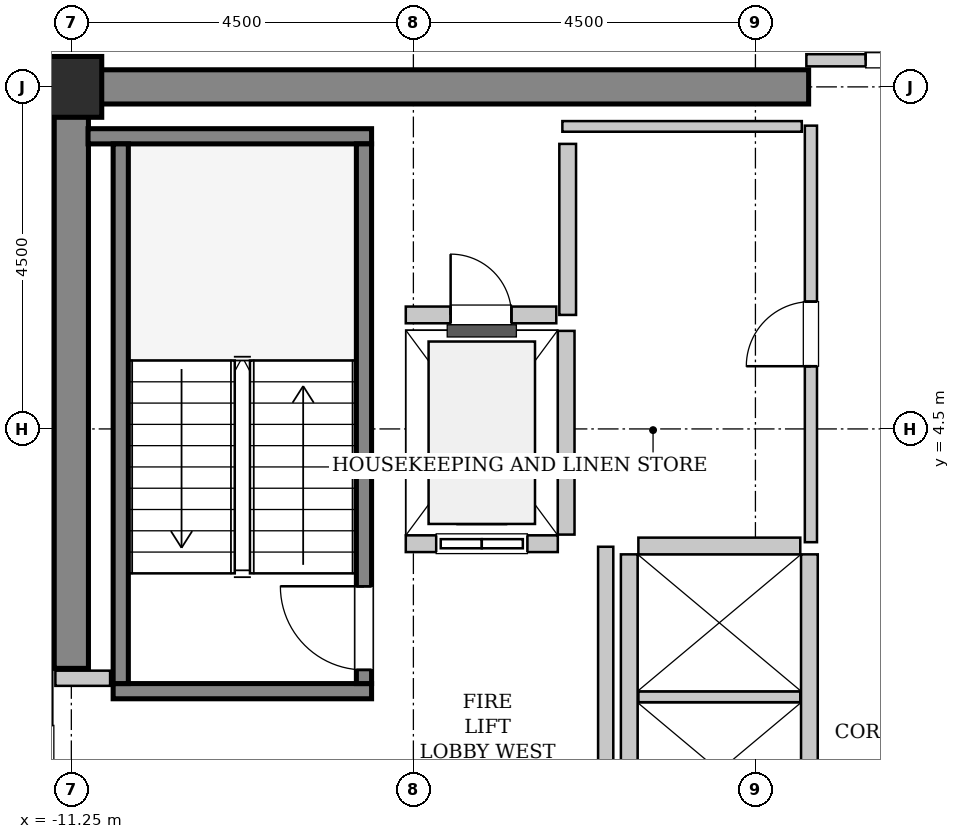
"""IFC4 building model, lengths in metres.
Left out: names, types, materials, properties, quantities, classifications, styles, units other than length and angle.
Written with IfcOpenShell. Run it as: python <this file> out.ifc"""

import sys

from ifc_helpers import new_model, si_unit, direction, frame, frame_2d, origin, origin_2d, place, context, subcontext, project, spatial, rectangle, hollow_rectangle, extrude, source, transform, mapped, element, fill, save


model = new_model("IFC4")
c1 = context("Model", 3, precision=1e-05, world=origin(), true_north=direction((0.0, 1.0)))
c2 = subcontext(c1, "Body", "Model", "MODEL_VIEW")
j1 = project(units=[si_unit("LENGTHUNIT", "METRE"), si_unit("PLANEANGLEUNIT", "RADIAN")], contexts=[c1])
p1 = place(None, origin())
s1 = spatial("IfcSite", under=j1, at=p1, CompositionType="ELEMENT")
p2 = place(p1, origin())
s2 = spatial("IfcBuilding", under=s1, at=p2, CompositionType="ELEMENT")
p3 = place(p2, frame((0.0, 0.0, 210.4)))
s3 = spatial("IfcBuildingStorey", under=s2, at=p3, CompositionType="ELEMENT", Elevation=210.4)
m1 = source(origin(), c2, "Body", "SweptSolid", [
    extrude(rectangle(XDim=9.925, YDim=0.45, at=frame_2d((4.962, 0.0))), origin(), (0.0, 0.0, 1.0), 3.8),
])
p4 = place(p3, frame((-11.475, 9.0, 0.0), z_axis=(0.0, 0.0, 1.0), x_axis=(1.0, 0.0, 0.0)))
e1 = element("IfcWall", 1, at=p4, inside=s3, PredefinedType="SHEAR", context=c2, shape_type="MappedRepresentation", body=[
    mapped(m1, transform((0.0, 0.0, 0.0), x_axis=(1.0, 0.0, 0.0), y_axis=(0.0, 1.0, 0.0), z_axis=(0.0, 0.0, 1.0), scale=1.0)),
])
m2 = source(origin(), c2, "Body", "SweptSolid", [
    extrude(rectangle(XDim=7.425, YDim=0.45, at=frame_2d((3.712, 0.0))), origin(), (0.0, 0.0, 1.0), 3.8),
])
p5 = place(p3, frame((-11.25, 1.35, 0.0), z_axis=(0.0, 0.0, 1.0), x_axis=(0.0, 1.0, 0.0)))
e2 = element("IfcWall", 2, at=p5, inside=s3, PredefinedType="SHEAR", context=c2, shape_type="MappedRepresentation", body=[
    mapped(m2, transform((0.0, 0.0, 0.0), x_axis=(1.0, 0.0, 0.0), y_axis=(0.0, 1.0, 0.0), z_axis=(0.0, 0.0, 1.0), scale=1.0)),
])
m3 = source(origin(), c2, "Body", "SweptSolid", [
    extrude(hollow_rectangle(XDim=0.8, YDim=0.8, WallThickness=0.04, InnerFilletRadius=0.04, OuterFilletRadius=0.08, at=origin_2d()), origin(), (0.0, 0.0, 1.0), 3.8),
])
p6 = place(p3, frame((-11.25, 9.0, 0.0), z_axis=(0.0, 0.0, 1.0), x_axis=(1.0, 0.0, 0.0)))
e3 = element("IfcColumn", 3, at=p6, inside=s3, PredefinedType="COLUMN", context=c2, shape_type="MappedRepresentation", body=[
    mapped(m3, transform((0.0, 0.0, 0.0), x_axis=(1.0, 0.0, 0.0), y_axis=(0.0, 1.0, 0.0), z_axis=(0.0, 0.0, 1.0), scale=1.0)),
])
m4 = source(origin(), c2, "Body", "SweptSolid", [
    extrude(rectangle(XDim=3.4, YDim=0.2, at=frame_2d((1.7, 0.0))), origin(), (0.0, 0.0, 1.0), 3.8),
])
p7 = place(p3, frame((-7.3, 1.05, 0.0), z_axis=(0.0, 0.0, 1.0), x_axis=(-1.0, 0.0, 0.0)))
e4 = element("IfcWall", 4, at=p7, inside=s3, PredefinedType="SOLIDWALL", context=c2, shape_type="MappedRepresentation", body=[
    mapped(m4, transform((0.0, 0.0, 0.0), x_axis=(1.0, 0.0, 0.0), y_axis=(0.0, 1.0, 0.0), z_axis=(0.0, 0.0, 1.0), scale=1.0)),
])
m5 = source(origin(), c2, "Body", "SweptSolid", [
    extrude(rectangle(XDim=3.73, YDim=0.2, at=frame_2d((1.865, 0.0))), origin(), (0.0, 0.0, 1.0), 3.8),
])
p8 = place(p3, frame((-7.3, 8.35, 0.0), z_axis=(0.0, 0.0, 1.0), x_axis=(-1.0, 0.0, 0.0)))
e5 = element("IfcWall", 5, at=p8, inside=s3, PredefinedType="SOLIDWALL", context=c2, shape_type="MappedRepresentation", body=[
    mapped(m5, transform((0.0, 0.0, 0.0), x_axis=(1.0, 0.0, 0.0), y_axis=(0.0, 1.0, 0.0), z_axis=(0.0, 0.0, 1.0), scale=1.0)),
])
m6 = source(origin(), c2, "Body", "SweptSolid", [
    extrude(rectangle(XDim=7.1, YDim=0.2, at=frame_2d((3.55, 0.0))), origin(), (0.0, 0.0, 1.0), 3.8),
])
p9 = place(p3, frame((-7.4, 1.15, 0.0), z_axis=(0.0, 0.0, 1.0), x_axis=(0.0, 1.0, 0.0)))
e6 = element("IfcWall", 6, at=p9, inside=s3, PredefinedType="SOLIDWALL", context=c2, shape_type="MappedRepresentation", body=[
    mapped(m6, transform((0.0, 0.0, 0.0), x_axis=(1.0, 0.0, 0.0), y_axis=(0.0, 1.0, 0.0), z_axis=(0.0, 0.0, 1.0), scale=1.0)),
])
p10 = place(p9, frame((0.18, 0.0, 0.0)))
e7 = element("IfcOpeningElement", 7, at=p10, cuts=e6, PredefinedType="OPENING", context=c2, shape_type="SweptSolid", body=[
    extrude(rectangle(XDim=1.1, YDim=2.15, at=frame_2d((0.55, 1.075))), frame((0.0, 0.11, 0.0), z_axis=(0.0, -1.0, 0.0), x_axis=(1.0, 0.0, 0.0)), (0.0, 0.0, 1.0), 0.22),
])
p11 = place(p3, frame((-10.6, 1.15, 0.0), z_axis=(0.0, 0.0, 1.0), x_axis=(0.0, 1.0, 0.0)))
e8 = element("IfcWall", 8, at=p11, inside=s3, PredefinedType="SOLIDWALL", context=c2, shape_type="MappedRepresentation", body=[
    mapped(m6, transform((0.0, 0.0, 0.0), x_axis=(1.0, 0.0, 0.0), y_axis=(0.0, 1.0, 0.0), z_axis=(0.0, 0.0, 1.0), scale=1.0)),
])
m7 = source(origin(), c2, "Body", "SweptSolid", [
    extrude(rectangle(XDim=2.0, YDim=0.22, at=frame_2d((1.0, 0.0))), origin(), (0.0, 0.0, 1.0), 3.535),
])
p12 = place(p3, frame((-6.85, 2.99, 0.0), z_axis=(0.0, 0.0, 1.0), x_axis=(1.0, 0.0, 0.0)))
e9 = element("IfcWall", 9, at=p12, inside=s3, PredefinedType="SOLIDWALL", context=c2, shape_type="MappedRepresentation", body=[
    mapped(m7, transform((0.0, 0.0, 0.0), x_axis=(1.0, 0.0, 0.0), y_axis=(0.0, 1.0, 0.0), z_axis=(0.0, 0.0, 1.0), scale=1.0)),
])
p13 = place(p12, frame((0.4, 0.0, 0.0)))
e10 = element("IfcOpeningElement", 10, at=p13, cuts=e9, PredefinedType="OPENING", context=c2, shape_type="SweptSolid", body=[
    extrude(rectangle(XDim=1.2, YDim=2.2, at=frame_2d((0.6, 1.1))), frame((0.0, 0.12, 0.0), z_axis=(0.0, -1.0, 0.0), x_axis=(1.0, 0.0, 0.0)), (0.0, 0.0, 1.0), 0.24),
])
m8 = source(origin(), c2, "Body", "SweptSolid", [
    extrude(rectangle(XDim=2.68, YDim=0.22, at=frame_2d((1.34, 0.0))), origin(), (0.0, 0.0, 1.0), 3.535),
])
p14 = place(p3, frame((-4.74, 3.11, 0.0), z_axis=(0.0, 0.0, 1.0), x_axis=(0.0, 1.0, 0.0)))
e11 = element("IfcWall", 11, at=p14, inside=s3, PredefinedType="SOLIDWALL", context=c2, shape_type="MappedRepresentation", body=[
    mapped(m8, transform((0.0, 0.0, 0.0), x_axis=(1.0, 0.0, 0.0), y_axis=(0.0, 1.0, 0.0), z_axis=(0.0, 0.0, 1.0), scale=1.0)),
])
m9 = source(origin(), c2, "Body", "SweptSolid", [
    extrude(rectangle(XDim=5.7, YDim=0.22, at=frame_2d((2.85, 0.0))), origin(), (0.0, 0.0, 1.0), 3.535),
])
for number, where, z_axis, x_axis in (
    (12, (-1.54, -2.85, 0.0), (0.0, 0.0, 1.0), (0.0, 1.0, 0.0)),
    (13, (-3.91, 2.85, 0.0), (0.0, 0.0, 1.0), (0.0, -1.0, 0.0)),
):
    element("IfcWall", number, at=place(p3, frame(where, z_axis=z_axis, x_axis=x_axis)), inside=s3, PredefinedType="SOLIDWALL", context=c2, shape_type="MappedRepresentation", body=[
        mapped(m9, transform((0.0, 0.0, 0.0), x_axis=(1.0, 0.0, 0.0), y_axis=(0.0, 1.0, 0.0), z_axis=(0.0, 0.0, 1.0), scale=1.0)),
    ])
m10 = source(origin(), c2, "Body", "SweptSolid", [
    extrude(rectangle(XDim=2.13, YDim=0.14, at=frame_2d((1.065, 0.0))), origin(), (0.0, 0.0, 1.0), 3.535),
])
p15 = place(p3, frame((-3.79, 0.975, 0.0), z_axis=(0.0, 0.0, 1.0), x_axis=(1.0, 0.0, 0.0)))
e14 = element("IfcWall", 14, at=p15, inside=s3, PredefinedType="PARTITIONING", context=c2, shape_type="MappedRepresentation", body=[
    mapped(m10, transform((0.0, 0.0, 0.0), x_axis=(1.0, 0.0, 0.0), y_axis=(0.0, 1.0, 0.0), z_axis=(0.0, 0.0, 1.0), scale=1.0)),
])
m11 = source(origin(), c2, "Body", "SweptSolid", [
    extrude(rectangle(XDim=2.13, YDim=0.22, at=frame_2d((1.065, 0.0))), origin(), (0.0, 0.0, 1.0), 3.535),
])
p16 = place(p3, frame((-1.66, 2.96, 0.0), z_axis=(0.0, 0.0, 1.0), x_axis=(-1.0, 0.0, 0.0)))
e15 = element("IfcWall", 15, at=p16, inside=s3, PredefinedType="SOLIDWALL", context=c2, shape_type="MappedRepresentation", body=[
    mapped(m11, transform((0.0, 0.0, 0.0), x_axis=(1.0, 0.0, 0.0), y_axis=(0.0, 1.0, 0.0), z_axis=(0.0, 0.0, 1.0), scale=1.0)),
])
m12 = source(origin(), c2, "Body", "SweptSolid", [
    extrude(rectangle(XDim=2.25, YDim=0.22, at=frame_2d((1.125, 0.0))), origin(), (0.0, 0.0, 1.0), 3.535),
])
p17 = place(p3, frame((-4.72, 6.0, 0.0), z_axis=(0.0, 0.0, 1.0), x_axis=(0.0, 1.0, 0.0)))
e16 = element("IfcWall", 16, at=p17, inside=s3, PredefinedType="SOLIDWALL", context=c2, shape_type="MappedRepresentation", body=[
    mapped(m12, transform((0.0, 0.0, 0.0), x_axis=(1.0, 0.0, 0.0), y_axis=(0.0, 1.0, 0.0), z_axis=(0.0, 0.0, 1.0), scale=1.0)),
])
m13 = source(origin(), c2, "Body", "SweptSolid", [
    extrude(rectangle(XDim=1.98, YDim=0.22, at=frame_2d((0.99, 0.0))), origin(), (0.0, 0.0, 1.0), 3.535),
])
p18 = place(p3, frame((-6.85, 6.0, 0.0), z_axis=(0.0, 0.0, 1.0), x_axis=(1.0, 0.0, 0.0)))
e17 = element("IfcWall", 17, at=p18, inside=s3, PredefinedType="SOLIDWALL", context=c2, shape_type="MappedRepresentation", body=[
    mapped(m13, transform((0.0, 0.0, 0.0), x_axis=(1.0, 0.0, 0.0), y_axis=(0.0, 1.0, 0.0), z_axis=(0.0, 0.0, 1.0), scale=1.0)),
])
p19 = place(p18, frame((0.59, 0.0, 0.0)))
e18 = element("IfcOpeningElement", 18, at=p19, cuts=e17, PredefinedType="OPENING", context=c2, shape_type="SweptSolid", body=[
    extrude(rectangle(XDim=0.8, YDim=2.0, at=frame_2d((0.4, 1.0))), frame((0.0, 0.12, 0.0), z_axis=(0.0, -1.0, 0.0), x_axis=(1.0, 0.0, 0.0)), (0.0, 0.0, 1.0), 0.24),
])
m14 = source(origin(), c2, "Body", "SweptSolid", [
    extrude(rectangle(XDim=5.9, YDim=0.2, at=frame_2d((2.95, 0.0))), origin(), (0.0, 0.0, 1.0), 3.535),
])
p20 = place(p3, frame((-4.22, -2.95, 0.0), z_axis=(0.0, 0.0, 1.0), x_axis=(0.0, 1.0, 0.0)))
e19 = element("IfcWall", 19, at=p20, inside=s3, PredefinedType="PARTITIONING", context=c2, shape_type="MappedRepresentation", body=[
    mapped(m14, transform((0.0, 0.0, 0.0), x_axis=(1.0, 0.0, 0.0), y_axis=(0.0, 1.0, 0.0), z_axis=(0.0, 0.0, 1.0), scale=1.0)),
])
m15 = source(origin(), c2, "Body", "SweptSolid", [
    extrude(rectangle(XDim=0.72, YDim=0.2, at=frame_2d((0.36, 0.0))), origin(), (0.0, 0.0, 1.0), 3.535),
])
p21 = place(p3, frame((-11.46, 1.22, 0.0), z_axis=(0.0, 0.0, 1.0), x_axis=(1.0, 0.0, 0.0)))
e20 = element("IfcWall", 20, at=p21, inside=s3, PredefinedType="PARTITIONING", context=c2, shape_type="MappedRepresentation", body=[
    mapped(m15, transform((0.0, 0.0, 0.0), x_axis=(1.0, 0.0, 0.0), y_axis=(0.0, 1.0, 0.0), z_axis=(0.0, 0.0, 1.0), scale=1.0)),
])
m16 = source(origin(), c2, "Body", "SweptSolid", [
    extrude(rectangle(XDim=3.16, YDim=0.16, at=frame_2d((1.58, 0.0))), origin(), (0.0, 0.0, 1.0), 2.625),
])
p22 = place(p3, frame((-1.58, 9.35, 0.0), z_axis=(0.0, 0.0, 1.0), x_axis=(1.0, 0.0, 0.0)))
e21 = element("IfcWall", 21, at=p22, inside=s3, PredefinedType="PARTITIONING", context=c2, shape_type="MappedRepresentation", body=[
    mapped(m16, transform((0.0, 0.0, 0.0), x_axis=(1.0, 0.0, 0.0), y_axis=(0.0, 1.0, 0.0), z_axis=(0.0, 0.0, 1.0), scale=1.0)),
])
p23 = place(p22, frame((0.78, 0.0, 0.0)))
e22 = element("IfcOpeningElement", 22, at=p23, cuts=e21, PredefinedType="OPENING", context=c2, shape_type="SweptSolid", body=[
    extrude(rectangle(XDim=1.6, YDim=2.3, at=frame_2d((0.8, 1.15))), frame((0.0, 0.09, 0.0), z_axis=(0.0, -1.0, 0.0), x_axis=(1.0, 0.0, 0.0)), (0.0, 0.0, 1.0), 0.18),
])
m17 = source(origin(), c2, "Body", "SweptSolid", [
    extrude(rectangle(XDim=5.48, YDim=0.16, at=frame_2d((2.74, 0.0))), origin(), (0.0, 0.0, 1.0), 3.535),
])
p24 = place(p3, frame((-1.52, 3.01, 0.0), z_axis=(0.0, 0.0, 1.0), x_axis=(0.0, 1.0, 0.0)))
e23 = element("IfcWall", 23, at=p24, inside=s3, PredefinedType="PARTITIONING", context=c2, shape_type="MappedRepresentation", body=[
    mapped(m17, transform((0.0, 0.0, 0.0), x_axis=(1.0, 0.0, 0.0), y_axis=(0.0, 1.0, 0.0), z_axis=(0.0, 0.0, 1.0), scale=1.0)),
])
p25 = place(p24, frame((2.315, 0.0, 0.0)))
e24 = element("IfcOpeningElement", 24, at=p25, cuts=e23, PredefinedType="OPENING", context=c2, shape_type="SweptSolid", body=[
    extrude(rectangle(XDim=0.85, YDim=2.1, at=frame_2d((0.425, 1.05))), frame((0.0, 0.09, 0.0), z_axis=(0.0, -1.0, 0.0), x_axis=(1.0, 0.0, 0.0)), (0.0, 0.0, 1.0), 0.18),
])
m18 = source(origin(), c2, "Body", "SweptSolid", [
    extrude(rectangle(XDim=3.15, YDim=0.14, at=frame_2d((1.575, 0.0))), origin(), (0.0, 0.0, 1.0), 3.535),
])
p26 = place(p3, frame((-4.79, 8.48, 0.0), z_axis=(0.0, 0.0, 1.0), x_axis=(1.0, 0.0, 0.0)))
e25 = element("IfcWall", 25, at=p26, inside=s3, PredefinedType="PARTITIONING", context=c2, shape_type="MappedRepresentation", body=[
    mapped(m18, transform((0.0, 0.0, 0.0), x_axis=(1.0, 0.0, 0.0), y_axis=(0.0, 1.0, 0.0), z_axis=(0.0, 0.0, 1.0), scale=1.0)),
])
m19 = source(origin(), c2, "Body", "SweptSolid", [
    extrude(rectangle(XDim=1.1, YDim=2.15, at=frame_2d((0.55, 1.075))), frame((0.0, 0.025, 0.0), z_axis=(0.0, -1.0, 0.0), x_axis=(1.0, 0.0, 0.0)), (0.0, 0.0, 1.0), 0.05),
])
p27 = place(p10, origin())
e26 = element("IfcDoor", 26, at=p27, inside=s3, OperationType="SINGLE_SWING_RIGHT", PredefinedType="DOOR", context=c2, shape_type="MappedRepresentation", body=[
    mapped(m19, transform((0.0, 0.0, 0.0), x_axis=(1.0, 0.0, 0.0), y_axis=(0.0, 1.0, 0.0), z_axis=(0.0, 0.0, 1.0), scale=1.0)),
])
fill(e7, e26)
m20 = source(origin(), c2, "Body", "SweptSolid", [
    extrude(rectangle(XDim=1.2, YDim=2.2, at=frame_2d((0.6, 1.1))), frame((0.0, 0.025, 0.0), z_axis=(0.0, -1.0, 0.0), x_axis=(1.0, 0.0, 0.0)), (0.0, 0.0, 1.0), 0.05),
])
p28 = place(p13, origin())
e27 = element("IfcDoor", 27, at=p28, inside=s3, OperationType="SLIDING_TO_LEFT", PredefinedType="DOOR", context=c2, shape_type="MappedRepresentation", body=[
    mapped(m20, transform((0.0, 0.0, 0.0), x_axis=(1.0, 0.0, 0.0), y_axis=(0.0, 1.0, 0.0), z_axis=(0.0, 0.0, 1.0), scale=1.0)),
])
fill(e10, e27)
m21 = source(origin(), c2, "Body", "SweptSolid", [
    extrude(rectangle(XDim=0.8, YDim=2.0, at=frame_2d((0.4, 1.0))), frame((0.0, 0.025, 0.0), z_axis=(0.0, -1.0, 0.0), x_axis=(1.0, 0.0, 0.0)), (0.0, 0.0, 1.0), 0.05),
])
p29 = place(p19, origin())
e28 = element("IfcDoor", 28, at=p29, inside=s3, OperationType="SINGLE_SWING_LEFT", PredefinedType="TRAPDOOR", context=c2, shape_type="MappedRepresentation", body=[
    mapped(m21, transform((0.0, 0.0, 0.0), x_axis=(1.0, 0.0, 0.0), y_axis=(0.0, 1.0, 0.0), z_axis=(0.0, 0.0, 1.0), scale=1.0)),
])
fill(e18, e28)
m22 = source(origin(), c2, "Body", "SweptSolid", [
    extrude(rectangle(XDim=1.6, YDim=2.3, at=frame_2d((0.8, 1.15))), frame((0.0, 0.025, 0.0), z_axis=(0.0, -1.0, 0.0), x_axis=(1.0, 0.0, 0.0)), (0.0, 0.0, 1.0), 0.05),
])
p30 = place(p23, origin())
e29 = element("IfcDoor", 29, at=p30, inside=s3, OperationType="DOUBLE_DOOR_SINGLE_SWING", PredefinedType="DOOR", context=c2, shape_type="MappedRepresentation", body=[
    mapped(m22, transform((0.0, 0.0, 0.0), x_axis=(1.0, 0.0, 0.0), y_axis=(0.0, 1.0, 0.0), z_axis=(0.0, 0.0, 1.0), scale=1.0)),
])
fill(e22, e29)
m23 = source(origin(), c2, "Body", "SweptSolid", [
    extrude(rectangle(XDim=0.85, YDim=2.1, at=frame_2d((0.425, 1.05))), frame((0.0, 0.025, 0.0), z_axis=(0.0, -1.0, 0.0), x_axis=(1.0, 0.0, 0.0)), (0.0, 0.0, 1.0), 0.05),
])
p31 = place(p25, origin())
e30 = element("IfcDoor", 30, at=p31, inside=s3, OperationType="SINGLE_SWING_LEFT", PredefinedType="DOOR", context=c2, shape_type="MappedRepresentation", body=[
    mapped(m23, transform((0.0, 0.0, 0.0), x_axis=(1.0, 0.0, 0.0), y_axis=(0.0, 1.0, 0.0), z_axis=(0.0, 0.0, 1.0), scale=1.0)),
])
fill(e24, e30)
save(model, sys.argv[1])
